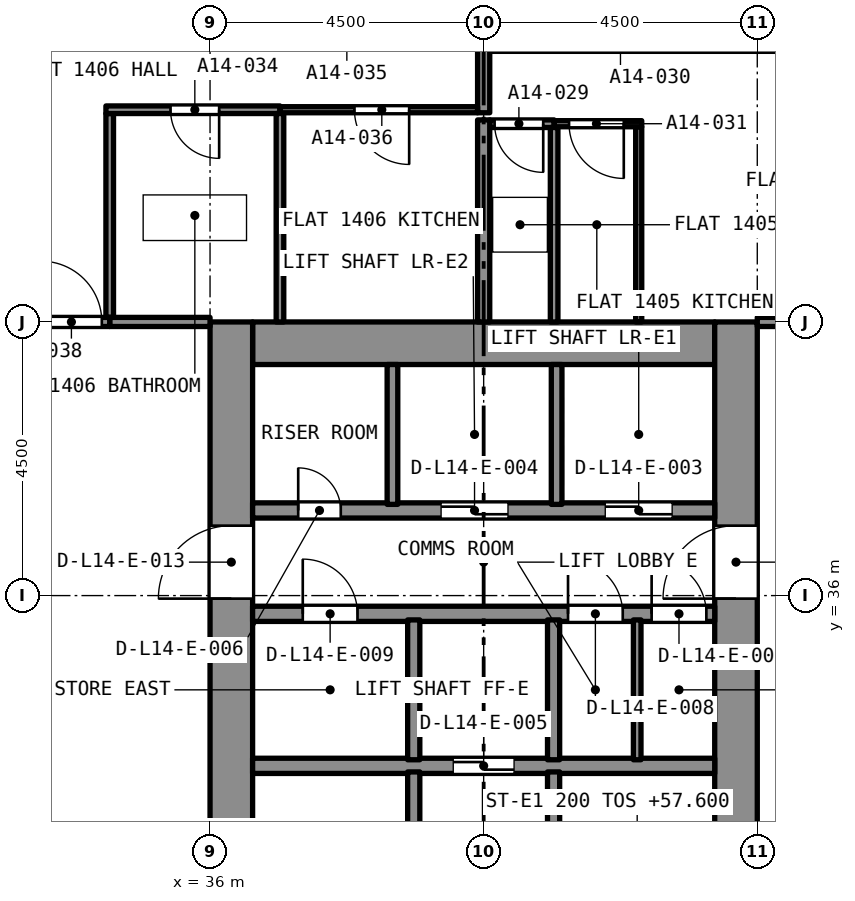
"""IFC4 building model, lengths in metres.
Left out: names, types, materials, properties, quantities, classifications, styles, units other than length and angle.
Written with IfcOpenShell. Run it as: python <this file> out.ifc"""

import sys

from ifc_helpers import new_model, si_unit, direction, frame, frame_2d, origin, place, context, subcontext, project, spatial, rectangle, extrude, element, fill, save


model = new_model("IFC4")
c1 = context("Model", 3, precision=1e-05, world=origin(), true_north=direction((0.0, 1.0)))
c2 = subcontext(c1, "Body", "Model", "MODEL_VIEW")
j1 = project(units=[si_unit("LENGTHUNIT", "METRE"), si_unit("PLANEANGLEUNIT", "RADIAN")], contexts=[c1])
p1 = place(None, origin())
s1 = spatial("IfcSite", under=j1, at=p1, CompositionType="ELEMENT")
p2 = place(p1, origin())
s2 = spatial("IfcBuilding", under=s1, at=p2, CompositionType="ELEMENT")
p3 = place(p2, frame((0.0, 0.0, 56.0)))
s3 = spatial("IfcBuildingStorey", under=s2, at=p3, CompositionType="ELEMENT", Elevation=56.0)
p4 = place(p3, frame((36.7, 40.15, 0.0), z_axis=(0.0, 0.0, 1.0), x_axis=(1.0, 0.0, 0.0)))
e1 = element("IfcWall", 1, at=p4, inside=s3, PredefinedType="SOLIDWALL", context=c2, shape_type="SweptSolid", body=[
    extrude(rectangle(XDim=7.6, YDim=0.7, at=frame_2d((3.8, 0.0))), origin(), (0.0, 0.0, 1.0), 3.2),
])
p5 = place(p3, frame((36.35, 27.0, 0.0), z_axis=(0.0, 0.0, 1.0), x_axis=(0.0, 1.0, 0.0)))
e2 = element("IfcWall", 2, at=p5, inside=s3, PredefinedType="SOLIDWALL", context=c2, shape_type="SweptSolid", body=[
    extrude(rectangle(XDim=13.5, YDim=0.7, at=frame_2d((6.75, 0.0))), origin(), (0.0, 0.0, 1.0), 3.2),
])
p6 = place(p5, frame((8.95, 0.0, 0.0)))
e3 = element("IfcOpeningElement", 3, at=p6, cuts=e2, PredefinedType="OPENING", context=c2, shape_type="SweptSolid", body=[
    extrude(rectangle(XDim=1.2, YDim=2.1, at=frame_2d((0.6, 1.05))), frame((0.0, 0.36, 0.0), z_axis=(0.0, -1.0, 0.0), x_axis=(1.0, 0.0, 0.0)), (0.0, 0.0, 1.0), 0.72),
])
p7 = place(p3, frame((44.65, 27.0, 0.0), z_axis=(0.0, 0.0, 1.0), x_axis=(0.0, 1.0, 0.0)))
e4 = element("IfcWall", 4, at=p7, inside=s3, PredefinedType="SOLIDWALL", context=c2, shape_type="SweptSolid", body=[
    extrude(rectangle(XDim=13.5, YDim=0.7, at=frame_2d((6.75, 0.0))), origin(), (0.0, 0.0, 1.0), 3.2),
])
p8 = place(p7, frame((8.95, 0.0, 0.0)))
e5 = element("IfcOpeningElement", 5, at=p8, cuts=e4, PredefinedType="OPENING", context=c2, shape_type="SweptSolid", body=[
    extrude(rectangle(XDim=1.2, YDim=2.1, at=frame_2d((0.6, 1.05))), frame((0.0, 0.36, 0.0), z_axis=(0.0, -1.0, 0.0), x_axis=(1.0, 0.0, 0.0)), (0.0, 0.0, 1.0), 0.72),
])
p9 = place(p3, frame((41.659, 43.76, 0.0), z_axis=(0.0, 0.0, 1.0), x_axis=(-1.0, 0.0, 0.0)))
e6 = element("IfcWall", 6, at=p9, inside=s3, PredefinedType="PARTITIONING", context=c2, shape_type="SweptSolid", body=[
    extrude(rectangle(XDim=1.059, YDim=0.125, at=frame_2d((0.53, 0.0))), origin(), (0.0, 0.0, 1.0), 2.9),
])
p10 = place(p9, frame((0.179, 0.0, 0.0)))
e7 = element("IfcOpeningElement", 7, at=p10, cuts=e6, PredefinedType="OPENING", context=c2, shape_type="SweptSolid", body=[
    extrude(rectangle(XDim=0.8, YDim=2.1, at=frame_2d((0.4, 1.05))), frame((0.0, 0.073, 0.0), z_axis=(0.0, -1.0, 0.0), x_axis=(1.0, 0.0, 0.0)), (0.0, 0.0, 1.0), 0.145),
])
p11 = place(p3, frame((41.659, 40.5, 0.0), z_axis=(0.0, 0.0, 1.0), x_axis=(0.0, 1.0, 0.0)))
e8 = element("IfcWall", 8, at=p11, inside=s3, PredefinedType="PARTITIONING", context=c2, shape_type="SweptSolid", body=[
    extrude(rectangle(XDim=3.198, YDim=0.125, at=frame_2d((1.599, 0.0))), origin(), (0.0, 0.0, 1.0), 2.9),
])
p12 = place(p3, frame((40.5, 40.5, 0.0), z_axis=(0.0, 0.0, 1.0), x_axis=(0.0, 1.0, 0.0)))
e9 = element("IfcWall", 9, at=p12, inside=s3, PredefinedType="PARTITIONING", context=c2, shape_type="SweptSolid", body=[
    extrude(rectangle(XDim=3.323, YDim=0.2, at=frame_2d((1.661, 0.0))), origin(), (0.0, 0.0, 1.0), 2.9),
])
p13 = place(p3, frame((43.05, 40.5, 0.0), z_axis=(0.0, 0.0, 1.0), x_axis=(0.0, 1.0, 0.0)))
e10 = element("IfcWall", 10, at=p13, inside=s3, PredefinedType="PARTITIONING", context=c2, shape_type="SweptSolid", body=[
    extrude(rectangle(XDim=3.21, YDim=0.1, at=frame_2d((1.605, 0.0))), origin(), (0.0, 0.0, 1.0), 2.9),
])
p14 = place(p3, frame((43.1, 43.76, 0.0), z_axis=(0.0, 0.0, 1.0), x_axis=(-1.0, 0.0, 0.0)))
e11 = element("IfcWall", 11, at=p14, inside=s3, PredefinedType="PARTITIONING", context=c2, shape_type="SweptSolid", body=[
    extrude(rectangle(XDim=1.441, YDim=0.1, at=frame_2d((0.72, 0.0))), origin(), (0.0, 0.0, 1.0), 2.9),
])
p15 = place(p14, frame((0.295, 0.0, 0.0)))
e12 = element("IfcOpeningElement", 12, at=p15, cuts=e11, PredefinedType="OPENING", context=c2, shape_type="SweptSolid", body=[
    extrude(rectangle(XDim=0.9, YDim=2.1, at=frame_2d((0.45, 1.05))), frame((0.0, 0.06, 0.0), z_axis=(0.0, -1.0, 0.0), x_axis=(1.0, 0.0, 0.0)), (0.0, 0.0, 1.0), 0.12),
])
p16 = place(p3, frame((40.5, 43.94, 0.0), z_axis=(0.0, 0.0, 1.0), x_axis=(0.0, 1.0, 0.0)))
e13 = element("IfcWall", 13, at=p16, inside=s3, PredefinedType="PARTITIONING", context=c2, shape_type="SweptSolid", body=[
    extrude(rectangle(XDim=4.86, YDim=0.2, at=frame_2d((2.43, 0.0))), origin(), (0.0, 0.0, 1.0), 2.9),
])
p17 = place(p3, frame((45.0, 40.5, 0.0), z_axis=(0.0, 0.0, 1.0), x_axis=(1.0, 0.0, 0.0)))
e14 = element("IfcWall", 14, at=p17, inside=s3, PredefinedType="PARTITIONING", context=c2, shape_type="SweptSolid", body=[
    extrude(rectangle(XDim=3.8, YDim=0.15, at=frame_2d((1.9, 0.0))), origin(), (0.0, 0.0, 1.0), 2.9),
])
p18 = place(p17, frame((1.75, 0.0, 0.0)))
e15 = element("IfcOpeningElement", 15, at=p18, cuts=e14, PredefinedType="OPENING", context=c2, shape_type="SweptSolid", body=[
    extrude(rectangle(XDim=1.0, YDim=2.1, at=frame_2d((0.5, 1.05))), frame((0.0, 0.085, 0.0), z_axis=(0.0, -1.0, 0.0), x_axis=(1.0, 0.0, 0.0)), (0.0, 0.0, 1.0), 0.17),
])
p19 = place(p3, frame((34.35, 40.575, 0.0), z_axis=(0.0, 0.0, 1.0), x_axis=(0.0, 1.0, 0.0)))
e16 = element("IfcWall", 16, at=p19, inside=s3, PredefinedType="PARTITIONING", context=c2, shape_type="SweptSolid", body=[
    extrude(rectangle(XDim=3.353, YDim=0.125, at=frame_2d((1.676, 0.0))), origin(), (0.0, 0.0, 1.0), 2.9),
])
p20 = place(p3, frame((37.15, 43.99, 0.0), z_axis=(0.0, 0.0, 1.0), x_axis=(-1.0, 0.0, 0.0)))
e17 = element("IfcWall", 17, at=p20, inside=s3, PredefinedType="PARTITIONING", context=c2, shape_type="SweptSolid", body=[
    extrude(rectangle(XDim=2.862, YDim=0.125, at=frame_2d((1.431, 0.0))), origin(), (0.0, 0.0, 1.0), 2.9),
])
p21 = place(p20, frame((1.0, 0.0, 0.0)))
e18 = element("IfcOpeningElement", 18, at=p21, cuts=e17, PredefinedType="OPENING", context=c2, shape_type="SweptSolid", body=[
    extrude(rectangle(XDim=0.8, YDim=2.1, at=frame_2d((0.4, 1.05))), frame((0.0, 0.073, 0.0), z_axis=(0.0, -1.0, 0.0), x_axis=(1.0, 0.0, 0.0)), (0.0, 0.0, 1.0), 0.145),
])
p22 = place(p3, frame((37.15, 40.5, 0.0), z_axis=(0.0, 0.0, 1.0), x_axis=(0.0, 1.0, 0.0)))
e19 = element("IfcWall", 19, at=p22, inside=s3, PredefinedType="PARTITIONING", context=c2, shape_type="SweptSolid", body=[
    extrude(rectangle(XDim=3.427, YDim=0.125, at=frame_2d((1.714, 0.0))), origin(), (0.0, 0.0, 1.0), 2.9),
])
p23 = place(p3, frame((34.35, 40.5, 0.0), z_axis=(0.0, 0.0, 1.0), x_axis=(1.0, 0.0, 0.0)))
e20 = element("IfcWall", 20, at=p23, inside=s3, PredefinedType="PARTITIONING", context=c2, shape_type="SweptSolid", body=[
    extrude(rectangle(XDim=1.65, YDim=0.15, at=frame_2d((0.825, 0.0))), origin(), (0.0, 0.0, 1.0), 2.9),
])
p24 = place(p3, frame((40.4, 43.99, 0.0), z_axis=(0.0, 0.0, 1.0), x_axis=(-1.0, 0.0, 0.0)))
e21 = element("IfcWall", 21, at=p24, inside=s3, PredefinedType="PARTITIONING", context=c2, shape_type="SweptSolid", body=[
    extrude(rectangle(XDim=3.25, YDim=0.1, at=frame_2d((1.625, 0.0))), origin(), (0.0, 0.0, 1.0), 2.9),
])
p25 = place(p24, frame((1.125, 0.0, 0.0)))
e22 = element("IfcOpeningElement", 22, at=p25, cuts=e21, PredefinedType="OPENING", context=c2, shape_type="SweptSolid", body=[
    extrude(rectangle(XDim=0.9, YDim=2.1, at=frame_2d((0.45, 1.05))), frame((0.0, 0.06, 0.0), z_axis=(0.0, -1.0, 0.0), x_axis=(1.0, 0.0, 0.0)), (0.0, 0.0, 1.0), 0.12),
])
p26 = place(p3, frame((32.2, 40.5, 0.0), z_axis=(0.0, 0.0, 1.0), x_axis=(1.0, 0.0, 0.0)))
e23 = element("IfcWall", 23, at=p26, inside=s3, PredefinedType="PARTITIONING", context=c2, shape_type="SweptSolid", body=[
    extrude(rectangle(XDim=2.15, YDim=0.15, at=frame_2d((1.075, 0.0))), origin(), (0.0, 0.0, 1.0), 2.9),
])
p27 = place(p26, frame((1.02, 0.0, 0.0)))
e24 = element("IfcOpeningElement", 24, at=p27, cuts=e23, PredefinedType="OPENING", context=c2, shape_type="SweptSolid", body=[
    extrude(rectangle(XDim=1.0, YDim=2.1, at=frame_2d((0.5, 1.05))), frame((0.0, 0.085, 0.0), z_axis=(0.0, -1.0, 0.0), x_axis=(1.0, 0.0, 0.0)), (0.0, 0.0, 1.0), 0.17),
])
p28 = place(p3, frame((36.7, 33.2, 0.0), z_axis=(0.0, 0.0, 1.0), x_axis=(1.0, 0.0, 0.0)))
e25 = element("IfcWall", 25, at=p28, inside=s3, PredefinedType="SOLIDWALL", context=c2, shape_type="SweptSolid", body=[
    extrude(rectangle(XDim=7.6, YDim=0.25, at=frame_2d((3.8, 0.0))), origin(), (0.0, 0.0, 1.0), 2.9),
])
p29 = place(p28, frame((3.3, 0.0, 0.0)))
e26 = element("IfcOpeningElement", 26, at=p29, cuts=e25, PredefinedType="OPENING", context=c2, shape_type="SweptSolid", body=[
    extrude(rectangle(XDim=1.0, YDim=2.1, at=frame_2d((0.5, 1.05))), frame((0.0, 0.135, 0.0), z_axis=(0.0, -1.0, 0.0), x_axis=(1.0, 0.0, 0.0)), (0.0, 0.0, 1.0), 0.27),
])
p30 = place(p3, frame((36.7, 35.7, 0.0), z_axis=(0.0, 0.0, 1.0), x_axis=(1.0, 0.0, 0.0)))
e27 = element("IfcWall", 27, at=p30, inside=s3, PredefinedType="SOLIDWALL", context=c2, shape_type="SweptSolid", body=[
    extrude(rectangle(XDim=7.6, YDim=0.25, at=frame_2d((3.8, 0.0))), origin(), (0.0, 0.0, 1.0), 2.9),
])
p31 = place(p30, frame((6.562, 0.0, 0.0)))
e28 = element("IfcOpeningElement", 28, at=p31, cuts=e27, PredefinedType="OPENING", context=c2, shape_type="SweptSolid", body=[
    extrude(rectangle(XDim=0.9, YDim=2.1, at=frame_2d((0.45, 1.05))), frame((0.0, 0.135, 0.0), z_axis=(0.0, -1.0, 0.0), x_axis=(1.0, 0.0, 0.0)), (0.0, 0.0, 1.0), 0.27),
])
p32 = place(p30, frame((5.188, 0.0, 0.0)))
e29 = element("IfcOpeningElement", 29, at=p32, cuts=e27, PredefinedType="OPENING", context=c2, shape_type="SweptSolid", body=[
    extrude(rectangle(XDim=0.9, YDim=2.1, at=frame_2d((0.45, 1.05))), frame((0.0, 0.135, 0.0), z_axis=(0.0, -1.0, 0.0), x_axis=(1.0, 0.0, 0.0)), (0.0, 0.0, 1.0), 0.27),
])
p33 = place(p30, frame((0.825, 0.0, 0.0)))
e30 = element("IfcOpeningElement", 30, at=p33, cuts=e27, PredefinedType="OPENING", context=c2, shape_type="SweptSolid", body=[
    extrude(rectangle(XDim=0.9, YDim=2.1, at=frame_2d((0.45, 1.05))), frame((0.0, 0.135, 0.0), z_axis=(0.0, -1.0, 0.0), x_axis=(1.0, 0.0, 0.0)), (0.0, 0.0, 1.0), 0.27),
])
p34 = place(p3, frame((36.7, 37.4, 0.0), z_axis=(0.0, 0.0, 1.0), x_axis=(1.0, 0.0, 0.0)))
e31 = element("IfcWall", 31, at=p34, inside=s3, PredefinedType="SOLIDWALL", context=c2, shape_type="SweptSolid", body=[
    extrude(rectangle(XDim=7.6, YDim=0.25, at=frame_2d((3.8, 0.0))), origin(), (0.0, 0.0, 1.0), 2.9),
])
p35 = place(p34, frame((5.8, 0.0, 0.0)))
e32 = element("IfcOpeningElement", 32, at=p35, cuts=e31, PredefinedType="OPENING", context=c2, shape_type="SweptSolid", body=[
    extrude(rectangle(XDim=1.1, YDim=2.4, at=frame_2d((0.55, 1.2))), frame((0.0, 0.135, 0.0), z_axis=(0.0, -1.0, 0.0), x_axis=(1.0, 0.0, 0.0)), (0.0, 0.0, 1.0), 0.27),
])
p36 = place(p34, frame((3.1, 0.0, 0.0)))
e33 = element("IfcOpeningElement", 33, at=p36, cuts=e31, PredefinedType="OPENING", context=c2, shape_type="SweptSolid", body=[
    extrude(rectangle(XDim=1.1, YDim=2.4, at=frame_2d((0.55, 1.2))), frame((0.0, 0.135, 0.0), z_axis=(0.0, -1.0, 0.0), x_axis=(1.0, 0.0, 0.0)), (0.0, 0.0, 1.0), 0.27),
])
p37 = place(p34, frame((0.75, 0.0, 0.0)))
e34 = element("IfcOpeningElement", 34, at=p37, cuts=e31, PredefinedType="OPENING", context=c2, shape_type="SweptSolid", body=[
    extrude(rectangle(XDim=0.7, YDim=2.1, at=frame_2d((0.35, 1.05))), frame((0.0, 0.135, 0.0), z_axis=(0.0, -1.0, 0.0), x_axis=(1.0, 0.0, 0.0)), (0.0, 0.0, 1.0), 0.27),
])
p38 = place(p3, frame((41.65, 27.7, 0.0), z_axis=(0.0, 0.0, 1.0), x_axis=(0.0, 1.0, 0.0)))
e35 = element("IfcWall", 35, at=p38, inside=s3, PredefinedType="SOLIDWALL", context=c2, shape_type="SweptSolid", body=[
    extrude(rectangle(XDim=5.4, YDim=0.2, at=frame_2d((2.7, 0.0))), origin(), (0.0, 0.0, 1.0), 2.9),
])
p39 = place(p38, frame((0.2, 0.0, 0.0)))
e36 = element("IfcOpeningElement", 36, at=p39, cuts=e35, PredefinedType="OPENING", context=c2, shape_type="SweptSolid", body=[
    extrude(rectangle(XDim=0.9, YDim=2.1, at=frame_2d((0.45, 1.05))), frame((0.0, 0.11, 0.0), z_axis=(0.0, -1.0, 0.0), x_axis=(1.0, 0.0, 0.0)), (0.0, 0.0, 1.0), 0.22),
])
p40 = place(p3, frame((39.35, 27.7, 0.0), z_axis=(0.0, 0.0, 1.0), x_axis=(0.0, 1.0, 0.0)))
e37 = element("IfcWall", 37, at=p40, inside=s3, PredefinedType="SOLIDWALL", context=c2, shape_type="SweptSolid", body=[
    extrude(rectangle(XDim=5.4, YDim=0.2, at=frame_2d((2.7, 0.0))), origin(), (0.0, 0.0, 1.0), 2.9),
])
p41 = place(p40, frame((0.2, 0.0, 0.0)))
e38 = element("IfcOpeningElement", 38, at=p41, cuts=e37, PredefinedType="OPENING", context=c2, shape_type="SweptSolid", body=[
    extrude(rectangle(XDim=0.9, YDim=2.1, at=frame_2d((0.45, 1.05))), frame((0.0, 0.11, 0.0), z_axis=(0.0, -1.0, 0.0), x_axis=(1.0, 0.0, 0.0)), (0.0, 0.0, 1.0), 0.22),
])
for number, where, z_axis, x_axis in (
    (39, (41.65, 33.3, 0.0), (0.0, 0.0, 1.0), (0.0, 1.0, 0.0)),
    (40, (39.35, 33.3, 0.0), (0.0, 0.0, 1.0), (0.0, 1.0, 0.0)),
):
    element("IfcWall", number, at=place(p3, frame(where, z_axis=z_axis, x_axis=x_axis)), inside=s3, PredefinedType="SOLIDWALL", context=c2, shape_type="SweptSolid", body=[
        extrude(rectangle(XDim=2.3, YDim=0.2, at=frame_2d((1.15, 0.0))), origin(), (0.0, 0.0, 1.0), 2.9),
    ])
for number, where, z_axis, x_axis in (
    (41, (41.7, 37.5, 0.0), (0.0, 0.0, 1.0), (0.0, 1.0, 0.0)),
    (42, (39.0, 37.5, 0.0), (0.0, 0.0, 1.0), (0.0, 1.0, 0.0)),
):
    element("IfcWall", number, at=place(p3, frame(where, z_axis=z_axis, x_axis=x_axis)), inside=s3, PredefinedType="SOLIDWALL", context=c2, shape_type="SweptSolid", body=[
        extrude(rectangle(XDim=2.3, YDim=0.175, at=frame_2d((1.15, 0.0))), origin(), (0.0, 0.0, 1.0), 2.9),
    ])
p42 = place(p3, frame((43.025, 33.3, 0.0), z_axis=(0.0, 0.0, 1.0), x_axis=(0.0, 1.0, 0.0)))
e43 = element("IfcWall", 43, at=p42, inside=s3, PredefinedType="PARTITIONING", context=c2, shape_type="SweptSolid", body=[
    extrude(rectangle(XDim=2.3, YDim=0.125, at=frame_2d((1.15, 0.0))), origin(), (0.0, 0.0, 1.0), 2.9),
])
p43 = place(p10, origin())
e44 = element("IfcDoor", 44, at=p43, inside=s3, OperationType="SINGLE_SWING_RIGHT", PredefinedType="DOOR", context=c2, shape_type="SweptSolid", body=[
    extrude(rectangle(XDim=0.8, YDim=2.1, at=frame_2d((0.4, 1.05))), frame((0.0, 0.025, 0.0), z_axis=(0.0, -1.0, 0.0), x_axis=(1.0, 0.0, 0.0)), (0.0, 0.0, 1.0), 0.05),
])
fill(e7, e44)
p44 = place(p15, origin())
e45 = element("IfcDoor", 45, at=p44, inside=s3, OperationType="SINGLE_SWING_RIGHT", PredefinedType="DOOR", context=c2, shape_type="SweptSolid", body=[
    extrude(rectangle(XDim=0.9, YDim=2.1, at=frame_2d((0.45, 1.05))), frame((0.0, 0.025, 0.0), z_axis=(0.0, -1.0, 0.0), x_axis=(1.0, 0.0, 0.0)), (0.0, 0.0, 1.0), 0.05),
])
fill(e12, e45)
p45 = place(p21, origin())
e46 = element("IfcDoor", 46, at=p45, inside=s3, OperationType="SINGLE_SWING_LEFT", PredefinedType="DOOR", context=c2, shape_type="SweptSolid", body=[
    extrude(rectangle(XDim=0.8, YDim=2.1, at=frame_2d((0.4, 1.05))), frame((0.0, 0.025, 0.0), z_axis=(0.0, -1.0, 0.0), x_axis=(1.0, 0.0, 0.0)), (0.0, 0.0, 1.0), 0.05),
])
fill(e18, e46)
p46 = place(p25, origin())
e47 = element("IfcDoor", 47, at=p46, inside=s3, OperationType="SINGLE_SWING_LEFT", PredefinedType="DOOR", context=c2, shape_type="SweptSolid", body=[
    extrude(rectangle(XDim=0.9, YDim=2.1, at=frame_2d((0.45, 1.05))), frame((0.0, 0.025, 0.0), z_axis=(0.0, -1.0, 0.0), x_axis=(1.0, 0.0, 0.0)), (0.0, 0.0, 1.0), 0.05),
])
fill(e22, e47)
p47 = place(p27, origin())
e48 = element("IfcDoor", 48, at=p47, inside=s3, OperationType="SINGLE_SWING_RIGHT", PredefinedType="DOOR", context=c2, shape_type="SweptSolid", body=[
    extrude(rectangle(XDim=1.0, YDim=2.1, at=frame_2d((0.5, 1.05))), frame((0.0, 0.025, 0.0), z_axis=(0.0, -1.0, 0.0), x_axis=(1.0, 0.0, 0.0)), (0.0, 0.0, 1.0), 0.05),
])
fill(e24, e48)
p48 = place(p35, origin())
e49 = element("IfcDoor", 49, at=p48, inside=s3, OperationType="SLIDING_TO_LEFT", PredefinedType="DOOR", context=c2, shape_type="SweptSolid", body=[
    extrude(rectangle(XDim=1.1, YDim=2.4, at=frame_2d((0.55, 1.2))), frame((0.0, 0.025, 0.0), z_axis=(0.0, -1.0, 0.0), x_axis=(1.0, 0.0, 0.0)), (0.0, 0.0, 1.0), 0.05),
])
fill(e32, e49)
p49 = place(p36, origin())
e50 = element("IfcDoor", 50, at=p49, inside=s3, OperationType="SLIDING_TO_LEFT", PredefinedType="DOOR", context=c2, shape_type="SweptSolid", body=[
    extrude(rectangle(XDim=1.1, YDim=2.4, at=frame_2d((0.55, 1.2))), frame((0.0, 0.025, 0.0), z_axis=(0.0, -1.0, 0.0), x_axis=(1.0, 0.0, 0.0)), (0.0, 0.0, 1.0), 0.05),
])
fill(e33, e50)
p50 = place(p29, origin())
e51 = element("IfcDoor", 51, at=p50, inside=s3, OperationType="SLIDING_TO_LEFT", PredefinedType="DOOR", context=c2, shape_type="SweptSolid", body=[
    extrude(rectangle(XDim=1.0, YDim=2.1, at=frame_2d((0.5, 1.05))), frame((0.0, 0.025, 0.0), z_axis=(0.0, -1.0, 0.0), x_axis=(1.0, 0.0, 0.0)), (0.0, 0.0, 1.0), 0.05),
])
fill(e26, e51)
p51 = place(p37, origin())
e52 = element("IfcDoor", 52, at=p51, inside=s3, OperationType="SINGLE_SWING_LEFT", PredefinedType="DOOR", context=c2, shape_type="SweptSolid", body=[
    extrude(rectangle(XDim=0.7, YDim=2.1, at=frame_2d((0.35, 1.05))), frame((0.0, 0.025, 0.0), z_axis=(0.0, -1.0, 0.0), x_axis=(1.0, 0.0, 0.0)), (0.0, 0.0, 1.0), 0.05),
])
fill(e34, e52)
p52 = place(p31, origin())
e53 = element("IfcDoor", 53, at=p52, inside=s3, OperationType="SINGLE_SWING_LEFT", PredefinedType="DOOR", context=c2, shape_type="SweptSolid", body=[
    extrude(rectangle(XDim=0.9, YDim=2.1, at=frame_2d((0.45, 1.05))), frame((0.0, 0.025, 0.0), z_axis=(0.0, -1.0, 0.0), x_axis=(1.0, 0.0, 0.0)), (0.0, 0.0, 1.0), 0.05),
])
fill(e28, e53)
p53 = place(p32, origin())
e54 = element("IfcDoor", 54, at=p53, inside=s3, OperationType="SINGLE_SWING_LEFT", PredefinedType="DOOR", context=c2, shape_type="SweptSolid", body=[
    extrude(rectangle(XDim=0.9, YDim=2.1, at=frame_2d((0.45, 1.05))), frame((0.0, 0.025, 0.0), z_axis=(0.0, -1.0, 0.0), x_axis=(1.0, 0.0, 0.0)), (0.0, 0.0, 1.0), 0.05),
])
fill(e29, e54)
p54 = place(p33, origin())
e55 = element("IfcDoor", 55, at=p54, inside=s3, OperationType="SINGLE_SWING_LEFT", PredefinedType="DOOR", context=c2, shape_type="SweptSolid", body=[
    extrude(rectangle(XDim=0.9, YDim=2.1, at=frame_2d((0.45, 1.05))), frame((0.0, 0.025, 0.0), z_axis=(0.0, -1.0, 0.0), x_axis=(1.0, 0.0, 0.0)), (0.0, 0.0, 1.0), 0.05),
])
fill(e30, e55)
p55 = place(p6, origin())
e56 = element("IfcDoor", 56, at=p55, inside=s3, OperationType="SINGLE_SWING_LEFT", PredefinedType="DOOR", context=c2, shape_type="SweptSolid", body=[
    extrude(rectangle(XDim=1.2, YDim=2.1, at=frame_2d((0.6, 1.05))), frame((0.0, 0.025, 0.0), z_axis=(0.0, -1.0, 0.0), x_axis=(1.0, 0.0, 0.0)), (0.0, 0.0, 1.0), 0.05),
])
fill(e3, e56)
p56 = place(p8, origin())
e57 = element("IfcDoor", 57, at=p56, inside=s3, OperationType="SINGLE_SWING_LEFT", PredefinedType="DOOR", context=c2, shape_type="SweptSolid", body=[
    extrude(rectangle(XDim=1.2, YDim=2.1, at=frame_2d((0.6, 1.05))), frame((0.0, 0.025, 0.0), z_axis=(0.0, -1.0, 0.0), x_axis=(1.0, 0.0, 0.0)), (0.0, 0.0, 1.0), 0.05),
])
fill(e5, e57)
save(model, sys.argv[1])
